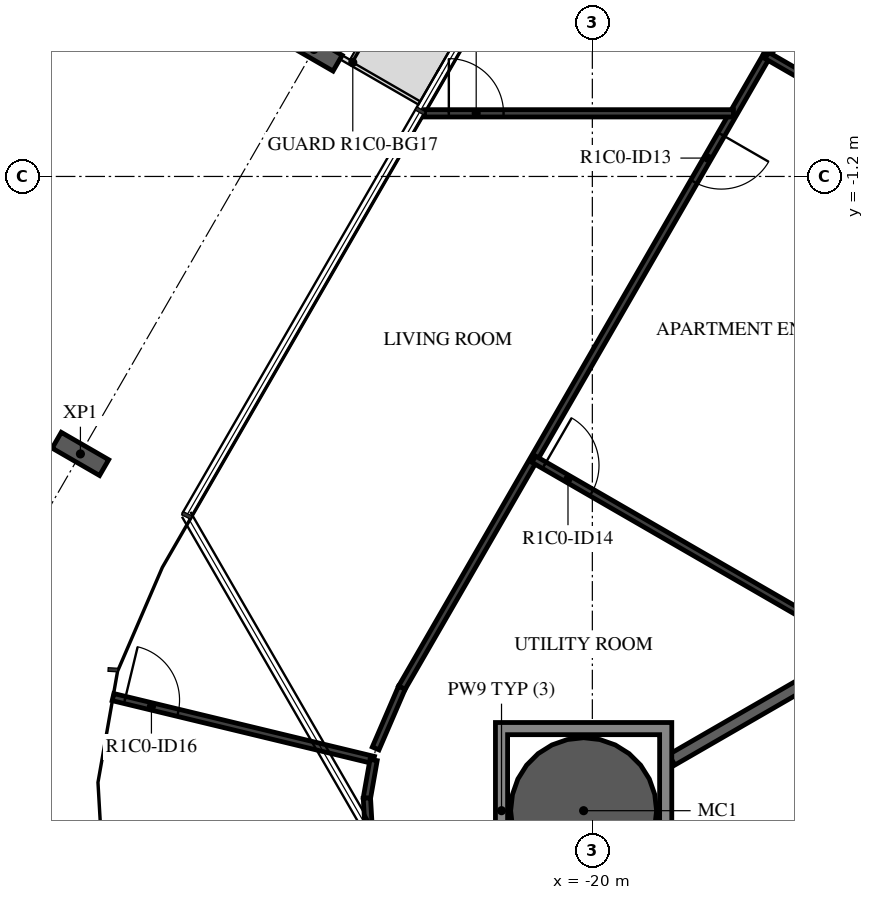
"""IFC4 building model, lengths in metres.
Left out: names, types, materials, properties, quantities, classifications, styles, units other than length and angle.
Written with IfcOpenShell. Run it as: python <this file> out.ifc"""

import sys

from ifc_helpers import new_model, si_unit, direction, frame, frame_2d, origin, origin_2d, place, context, subcontext, project, spatial, polyline, rectangle, hollow_circle, i_section, outline, extrude, element, fill, save


model = new_model("IFC4")
c1 = context("Model", 3, precision=1e-05, world=origin(), true_north=direction((0.0, 1.0)))
c2 = subcontext(c1, "Body", "Model", "MODEL_VIEW")
j1 = project(units=[si_unit("LENGTHUNIT", "METRE"), si_unit("PLANEANGLEUNIT", "RADIAN")], contexts=[c1])
p1 = place(None, origin())
s1 = spatial("IfcSite", under=j1, at=p1, CompositionType="ELEMENT")
p2 = place(p1, origin())
s2 = spatial("IfcBuilding", under=s1, at=p2, CompositionType="ELEMENT")
p3 = place(p2, frame((0.0, 0.0, 66.4)))
s3 = spatial("IfcBuildingStorey", under=s2, at=p3, CompositionType="ELEMENT", Elevation=66.4)
p4 = place(p3, frame((-20.144, -11.63, -0.38), z_axis=(0.0, 0.0, 1.0), x_axis=(1.0, 0.0, 0.0)))
e1 = element("IfcColumn", 1, at=p4, inside=s3, PredefinedType="COLUMN", context=c2, shape_type="SweptSolid", body=[
    extrude(hollow_circle(Radius=1.2, WallThickness=0.06, at=origin_2d()), origin(), (0.0, 0.0, 1.0), 2.616),
])
for number, where, z_axis, x_axis in (
    (2, (-24.579, 0.888, -0.38), (0.0, 0.0, 1.0), (0.5, 0.866, 0.0)),
    (3, (-28.419, -5.763, -0.38), (0.0, 0.0, 1.0), (0.5, 0.866, 0.0)),
):
    element("IfcColumn", number, at=place(p3, frame(where, z_axis=z_axis, x_axis=x_axis)), inside=s3, PredefinedType="COLUMN", context=c2, shape_type="SweptSolid", body=[
        extrude(i_section(OverallWidth=0.3, OverallDepth=0.9, WebThickness=0.019, FlangeThickness=0.035, FilletRadius=0.03, at=origin_2d()), origin(), (0.0, 0.0, 1.0), 2.616),
    ])
p5 = place(p3, frame((-18.694, -10.793, 0.0), z_axis=(0.0, 0.0, 1.0), x_axis=(0.866046662726, 0.499963176624, 0.0)))
e4 = element("IfcWall", 4, at=p5, inside=s3, PredefinedType="STANDARD", context=c2, shape_type="SweptSolid", body=[
    extrude(rectangle(XDim=2.458, YDim=0.2, at=frame_2d((1.229, 0.0))), origin(), (0.0, 0.0, 1.0), 3.05),
])
p6 = place(p3, frame((-13.297, 7.429, 0.0), z_axis=(0.0, 0.0, 1.0), x_axis=(-0.49999903102, -0.866025963225, 0.0)))
e5 = element("IfcWall", 5, at=p6, inside=s3, PredefinedType="PARTITIONING", context=c2, shape_type="SweptSolid", body=[
    extrude(rectangle(XDim=7.667, YDim=0.12, at=frame_2d((3.833, 0.0))), origin(), (0.0, 0.0, 1.0), 3.05),
])
p7 = place(p3, frame((-17.13, 0.79, 0.0), z_axis=(0.0, 0.0, 1.0), x_axis=(-0.499997052475, -0.866027105532, 0.0)))
e6 = element("IfcWall", 6, at=p7, inside=s3, PredefinedType="PARTITIONING", context=c2, shape_type="SweptSolid", body=[
    extrude(rectangle(XDim=12.006, YDim=0.12, at=frame_2d((6.003, 0.0))), origin(), (0.0, 0.0, 1.0), 3.05),
])
p8 = place(p7, frame((1.498, 0.0, 0.0)))
e7 = element("IfcOpeningElement", 7, at=p8, cuts=e6, PredefinedType="OPENING", context=c2, shape_type="SweptSolid", body=[
    extrude(rectangle(XDim=0.9, YDim=2.1, at=frame_2d((0.45, 1.05))), frame((0.0, 0.07, 0.0), z_axis=(0.0, -1.0, 0.0), x_axis=(1.0, 0.0, 0.0)), (0.0, 0.0, 1.0), 0.14),
])
p9 = place(p3, frame((-15.2, -0.325, 0.0), z_axis=(0.0, 0.0, 1.0), x_axis=(-0.866003168561, 0.500038510559, 0.0)))
e8 = element("IfcWall", 8, at=p9, inside=s3, PredefinedType="PARTITIONING", context=c2, shape_type="SweptSolid", body=[
    extrude(rectangle(XDim=2.229, YDim=0.12, at=frame_2d((1.114, 0.0))), origin(), (0.0, 0.0, 1.0), 3.05),
])
p10 = place(p3, frame((-20.963, -5.85, 0.0), z_axis=(0.0, 0.0, 1.0), x_axis=(0.866021746608, -0.500006334362, 0.0)))
e9 = element("IfcWall", 9, at=p10, inside=s3, PredefinedType="PARTITIONING", context=c2, shape_type="SweptSolid", body=[
    extrude(rectangle(XDim=6.253, YDim=0.12, at=frame_2d((3.127, 0.0))), origin(), (0.0, 0.0, 1.0), 3.05),
])
p11 = place(p10, frame((0.2, 0.0, 0.0)))
e10 = element("IfcOpeningElement", 10, at=p11, cuts=e9, PredefinedType="OPENING", context=c2, shape_type="SweptSolid", body=[
    extrude(rectangle(XDim=0.9, YDim=2.1, at=frame_2d((0.45, 1.05))), frame((0.0, 0.07, 0.0), z_axis=(0.0, -1.0, 0.0), x_axis=(1.0, 0.0, 0.0)), (0.0, 0.0, 1.0), 0.14),
])
p12 = place(p3, frame((-22.76, -0.162, 0.0), z_axis=(0.0, 0.0, 1.0), x_axis=(1.0, 0.0, 0.0)))
e11 = element("IfcWall", 11, at=p12, inside=s3, PredefinedType="PARTITIONING", context=c2, shape_type="SweptSolid", body=[
    extrude(rectangle(XDim=5.081, YDim=0.12, at=frame_2d((2.54, 0.0))), origin(), (0.0, 0.0, 1.0), 3.05),
])
p13 = place(p12, frame((0.4, 0.0, 0.0)))
e12 = element("IfcOpeningElement", 12, at=p13, cuts=e11, PredefinedType="OPENING", context=c2, shape_type="SweptSolid", body=[
    extrude(rectangle(XDim=0.9, YDim=2.1, at=frame_2d((0.45, 1.05))), frame((0.0, 0.07, 0.0), z_axis=(0.0, -1.0, 0.0), x_axis=(1.0, 0.0, 0.0)), (0.0, 0.0, 1.0), 0.14),
])
p14 = place(p3, frame((-23.564, -10.606, 0.0), z_axis=(0.0, 0.0, 1.0), x_axis=(0.396195073027, 0.918166359713, 0.0)))
e13 = element("IfcWall", 13, at=p14, inside=s3, PredefinedType="PARTITIONING", context=c2, shape_type="SweptSolid", body=[
    extrude(rectangle(XDim=1.087, YDim=0.12, at=frame_2d((0.543, 0.0))), origin(), (0.0, 0.0, 1.0), 3.05),
])
p15 = place(p3, frame((-27.883, -9.762, 0.0), z_axis=(0.0, 0.0, 1.0), x_axis=(0.972097015458, -0.234579181809, 0.0)))
e14 = element("IfcWall", 14, at=p15, inside=s3, PredefinedType="PARTITIONING", context=c2, shape_type="SweptSolid", body=[
    extrude(rectangle(XDim=4.409, YDim=0.12, at=frame_2d((2.204, 0.0))), origin(), (0.0, 0.0, 1.0), 3.05),
])
p16 = place(p15, frame((0.2, 0.0, 0.0)))
e15 = element("IfcOpeningElement", 15, at=p16, cuts=e14, PredefinedType="OPENING", context=c2, shape_type="SweptSolid", body=[
    extrude(rectangle(XDim=0.9, YDim=2.1, at=frame_2d((0.45, 1.05))), frame((0.0, 0.07, 0.0), z_axis=(0.0, -1.0, 0.0), x_axis=(1.0, 0.0, 0.0)), (0.0, 0.0, 1.0), 0.14),
])
p17 = place(p3, frame((-23.597, -10.796, 0.0), z_axis=(0.0, 0.0, 1.0), x_axis=(-0.173610040386, -0.984814476882, 0.0)))
e16 = element("IfcWall", 16, at=p17, inside=s3, PredefinedType="PARTITIONING", context=c2, shape_type="SweptSolid", body=[
    extrude(rectangle(XDim=0.636, YDim=0.12, at=frame_2d((0.318, 0.0))), origin(), (0.0, 0.0, 1.0), 3.05),
])
p18 = place(p3, frame((-23.708, -11.422, 0.0), z_axis=(0.0, 0.0, 1.0), x_axis=(0.058031280246, -0.998314765248, 0.0)))
e17 = element("IfcWall", 17, at=p18, inside=s3, PredefinedType="PARTITIONING", context=c2, shape_type="SweptSolid", body=[
    extrude(rectangle(XDim=0.829, YDim=0.12, at=frame_2d((0.415, 0.0))), origin(), (0.0, 0.0, 1.0), 3.05),
])
p19 = place(p3, origin())
e18 = element("IfcWall", 18, at=p19, inside=s3, PredefinedType="STANDARD", context=c2, shape_type="SweptSolid", body=[
    extrude(outline(polyline([(-18.694, -10.18), (-18.694, -13.08), (-21.594, -13.08), (-21.594, -10.18), (-18.694, -10.18)]), holes=[polyline([(-21.394, -12.88), (-18.894, -12.88), (-18.894, -10.38), (-21.394, -10.38), (-21.394, -12.88)])]), origin(), (0.0, 0.0, 1.0), 3.05),
])
p20 = place(p8, origin())
e19 = element("IfcDoor", 19, at=p20, inside=s3, OperationType="SINGLE_SWING_RIGHT", PredefinedType="DOOR", context=c2, shape_type="SweptSolid", body=[
    extrude(rectangle(XDim=0.9, YDim=2.1, at=frame_2d((0.45, 1.05))), frame((0.0, 0.025, 0.0), z_axis=(0.0, -1.0, 0.0), x_axis=(1.0, 0.0, 0.0)), (0.0, 0.0, 1.0), 0.05),
])
fill(e7, e19)
p21 = place(p11, origin())
e20 = element("IfcDoor", 20, at=p21, inside=s3, OperationType="SINGLE_SWING_RIGHT", PredefinedType="DOOR", context=c2, shape_type="SweptSolid", body=[
    extrude(rectangle(XDim=0.9, YDim=2.1, at=frame_2d((0.45, 1.05))), frame((0.0, 0.025, 0.0), z_axis=(0.0, -1.0, 0.0), x_axis=(1.0, 0.0, 0.0)), (0.0, 0.0, 1.0), 0.05),
])
fill(e10, e20)
p22 = place(p13, origin())
e21 = element("IfcDoor", 21, at=p22, inside=s3, OperationType="SINGLE_SWING_LEFT", PredefinedType="DOOR", context=c2, shape_type="SweptSolid", body=[
    extrude(rectangle(XDim=0.9, YDim=2.1, at=frame_2d((0.45, 1.05))), frame((0.0, 0.025, 0.0), z_axis=(0.0, -1.0, 0.0), x_axis=(1.0, 0.0, 0.0)), (0.0, 0.0, 1.0), 0.05),
])
fill(e12, e21)
p23 = place(p16, origin())
e22 = element("IfcDoor", 22, at=p23, inside=s3, OperationType="SINGLE_SWING_RIGHT", PredefinedType="DOOR", context=c2, shape_type="SweptSolid", body=[
    extrude(rectangle(XDim=0.9, YDim=2.1, at=frame_2d((0.45, 1.05))), frame((0.0, 0.025, 0.0), z_axis=(0.0, -1.0, 0.0), x_axis=(1.0, 0.0, 0.0)), (0.0, 0.0, 1.0), 0.05),
])
fill(e15, e22)
save(model, sys.argv[1])
